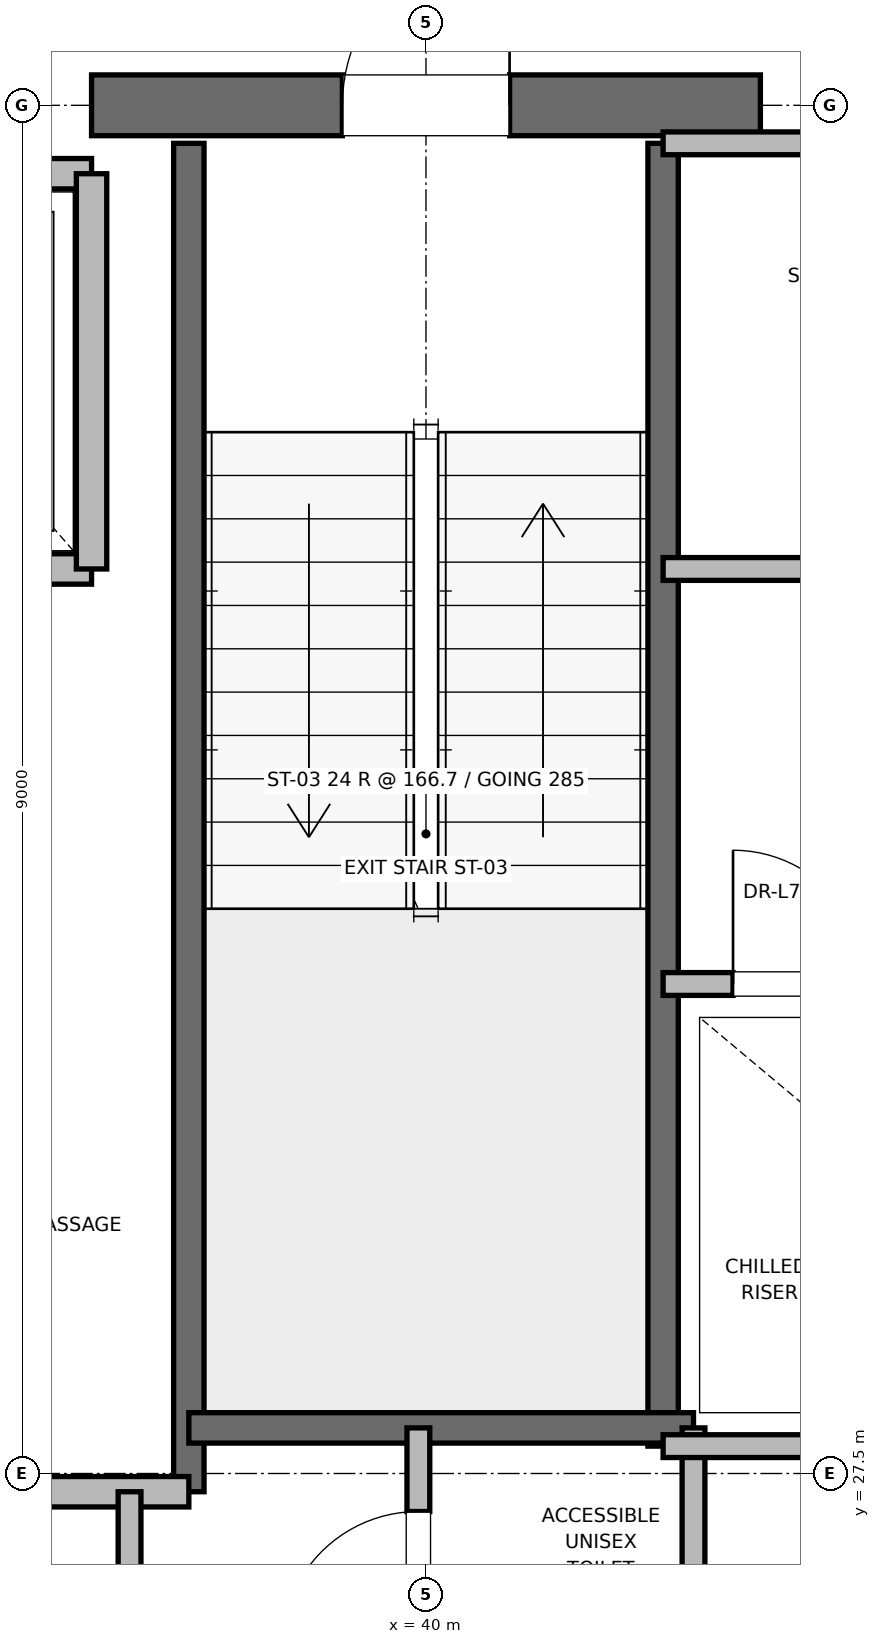
"""IFC4 building model, lengths in metres.
Left out: names, types, materials, properties, quantities, classifications, styles, units other than length and angle.
Written with IfcOpenShell. Run it as: python <this file> out.ifc"""

import sys

from ifc_helpers import new_model, si_unit, direction, frame, frame_2d, origin, place, context, subcontext, project, spatial, rectangle, extrude, element, fill, save


model = new_model("IFC4")
c1 = context("Model", 3, precision=1e-05, world=origin(), true_north=direction((0.0, 1.0)))
c2 = subcontext(c1, "Body", "Model", "MODEL_VIEW")
j1 = project(units=[si_unit("LENGTHUNIT", "METRE"), si_unit("PLANEANGLEUNIT", "RADIAN")], contexts=[c1])
p1 = place(None, origin())
s1 = spatial("IfcSite", under=j1, at=p1, CompositionType="ELEMENT")
p2 = place(p1, origin())
s2 = spatial("IfcBuilding", under=s1, at=p2, CompositionType="ELEMENT")
p3 = place(p2, frame((0.0, 0.0, 338.8)))
s3 = spatial("IfcBuildingStorey", under=s2, at=p3, CompositionType="ELEMENT", Elevation=338.8)
p4 = place(p3, frame((37.8, 36.5, 0.0), z_axis=(0.0, 0.0, 1.0), x_axis=(1.0, 0.0, 0.0)))
e1 = element("IfcWall", 1, at=p4, inside=s3, PredefinedType="SHEAR", context=c2, shape_type="SweptSolid", body=[
    extrude(rectangle(XDim=4.4, YDim=0.4, at=frame_2d((2.2, 0.0))), origin(), (0.0, 0.0, 1.0), 3.7),
])
p5 = place(p4, frame((1.65, 0.0, 0.0)))
e2 = element("IfcOpeningElement", 2, at=p5, cuts=e1, PredefinedType="OPENING", context=c2, shape_type="SweptSolid", body=[
    extrude(rectangle(XDim=1.1, YDim=2.15, at=frame_2d((0.55, 1.075))), frame((0.0, 0.2, 0.0), z_axis=(0.0, -1.0, 0.0), x_axis=(1.0, 0.0, 0.0)), (0.0, 0.0, 1.0), 0.4),
])
p6 = place(p3, frame((38.44, 27.38, 0.0), z_axis=(0.0, 0.0, 1.0), x_axis=(0.0, 1.0, 0.0)))
e3 = element("IfcWall", 3, at=p6, inside=s3, PredefinedType="SOLIDWALL", context=c2, shape_type="SweptSolid", body=[
    extrude(rectangle(XDim=8.87, YDim=0.2, at=frame_2d((4.435, 0.0))), origin(), (0.0, 0.0, 1.0), 3.7),
])
p7 = place(p3, frame((41.56, 27.68, 0.0), z_axis=(0.0, 0.0, 1.0), x_axis=(0.0, 1.0, 0.0)))
e4 = element("IfcWall", 4, at=p7, inside=s3, PredefinedType="SOLIDWALL", context=c2, shape_type="SweptSolid", body=[
    extrude(rectangle(XDim=8.57, YDim=0.2, at=frame_2d((4.285, 0.0))), origin(), (0.0, 0.0, 1.0), 3.7),
])
p8 = place(p3, frame((38.44, 27.8, 0.0), z_axis=(0.0, 0.0, 1.0), x_axis=(1.0, 0.0, 0.0)))
e5 = element("IfcWall", 5, at=p8, inside=s3, PredefinedType="SOLIDWALL", context=c2, shape_type="SweptSolid", body=[
    extrude(rectangle(XDim=3.32, YDim=0.2, at=frame_2d((1.66, 0.0))), origin(), (0.0, 0.0, 1.0), 3.7),
])
p9 = place(p3, frame((32.82, 27.38, 0.0), z_axis=(0.0, 0.0, 1.0), x_axis=(1.0, 0.0, 0.0)))
e6 = element("IfcWall", 6, at=p9, inside=s3, PredefinedType="PARTITIONING", context=c2, shape_type="SweptSolid", body=[
    extrude(rectangle(XDim=5.62, YDim=0.2, at=frame_2d((2.81, 0.0))), origin(), (0.0, 0.0, 1.0), 3.7),
])
p10 = place(p3, frame((35.5, 33.45, 0.0), z_axis=(0.0, 0.0, 1.0), x_axis=(1.0, 0.0, 0.0)))
e7 = element("IfcWall", 7, at=p10, inside=s3, PredefinedType="SOLIDWALL", context=c2, shape_type="SweptSolid", body=[
    extrude(rectangle(XDim=2.3, YDim=0.2, at=frame_2d((1.15, 0.0))), origin(), (0.0, 0.0, 1.0), 3.7),
])
p11 = place(p10, frame((0.6, 0.0, 0.0)))
e8 = element("IfcOpeningElement", 8, at=p11, cuts=e7, PredefinedType="OPENING", context=c2, shape_type="SweptSolid", body=[
    extrude(rectangle(XDim=1.1, YDim=2.2, at=frame_2d((0.55, 1.1))), frame((0.0, 0.1, 0.0), z_axis=(0.0, -1.0, 0.0), x_axis=(1.0, 0.0, 0.0)), (0.0, 0.0, 1.0), 0.2),
])
p12 = place(p3, frame((37.8, 36.05, 0.0), z_axis=(0.0, 0.0, 1.0), x_axis=(-1.0, 0.0, 0.0)))
e9 = element("IfcWall", 9, at=p12, inside=s3, PredefinedType="SOLIDWALL", context=c2, shape_type="SweptSolid", body=[
    extrude(rectangle(XDim=2.3, YDim=0.2, at=frame_2d((1.15, 0.0))), origin(), (0.0, 0.0, 1.0), 2.78),
])
p13 = place(p3, frame((37.8, 33.45, 0.0), z_axis=(0.0, 0.0, 1.0), x_axis=(0.0, 1.0, 0.0)))
e10 = element("IfcWall", 10, at=p13, inside=s3, PredefinedType="SOLIDWALL", context=c2, shape_type="SweptSolid", body=[
    extrude(rectangle(XDim=2.6, YDim=0.2, at=frame_2d((1.3, 0.0))), origin(), (0.0, 0.0, 1.0), 2.78),
])
p14 = place(p3, frame((41.76, 23.8, 0.0), z_axis=(0.0, 0.0, 1.0), x_axis=(0.0, 1.0, 0.0)))
e11 = element("IfcWall", 11, at=p14, inside=s3, PredefinedType="PARTITIONING", context=c2, shape_type="SweptSolid", body=[
    extrude(rectangle(XDim=4.0, YDim=0.15, at=frame_2d((2.0, 0.0))), origin(), (0.0, 0.0, 1.0), 2.85),
])
p15 = place(p3, frame((39.95, 25.8, 0.0), z_axis=(0.0, 0.0, 1.0), x_axis=(0.0, 1.0, 0.0)))
e12 = element("IfcWall", 12, at=p15, inside=s3, PredefinedType="PARTITIONING", context=c2, shape_type="SweptSolid", body=[
    extrude(rectangle(XDim=2.0, YDim=0.15, at=frame_2d((1.0, 0.0))), origin(), (0.0, 0.0, 1.0), 2.85),
])
p16 = place(p15, frame((0.55, 0.0, 0.0)))
e13 = element("IfcOpeningElement", 13, at=p16, cuts=e12, PredefinedType="OPENING", context=c2, shape_type="SweptSolid", body=[
    extrude(rectangle(XDim=0.9, YDim=2.1, at=frame_2d((0.45, 1.05))), frame((0.0, 0.075, 0.0), z_axis=(0.0, -1.0, 0.0), x_axis=(1.0, 0.0, 0.0)), (0.0, 0.0, 1.0), 0.15),
])
p17 = place(p3, frame((38.05, 23.06, 0.0), z_axis=(0.0, 0.0, 1.0), x_axis=(0.0, 1.0, 0.0)))
e14 = element("IfcWall", 14, at=p17, inside=s3, PredefinedType="PARTITIONING", context=c2, shape_type="SweptSolid", body=[
    extrude(rectangle(XDim=4.32, YDim=0.15, at=frame_2d((2.16, 0.0))), origin(), (0.0, 0.0, 1.0), 2.85),
])
p18 = place(p17, frame((1.66, 0.0, 0.0)))
e15 = element("IfcOpeningElement", 15, at=p18, cuts=e14, PredefinedType="OPENING", context=c2, shape_type="SweptSolid", body=[
    extrude(rectangle(XDim=1.0, YDim=2.15, at=frame_2d((0.5, 1.075))), frame((0.0, 0.075, 0.0), z_axis=(0.0, -1.0, 0.0), x_axis=(1.0, 0.0, 0.0)), (0.0, 0.0, 1.0), 0.15),
])
p19 = place(p3, frame((41.56, 27.68, 0.0), z_axis=(0.0, 0.0, 1.0), x_axis=(1.0, 0.0, 0.0)))
e16 = element("IfcWall", 16, at=p19, inside=s3, PredefinedType="PARTITIONING", context=c2, shape_type="SweptSolid", body=[
    extrude(rectangle(XDim=3.59, YDim=0.15, at=frame_2d((1.795, 0.0))), origin(), (0.0, 0.0, 1.0), 2.85),
])
p20 = place(p3, frame((41.56, 30.72, 0.0), z_axis=(0.0, 0.0, 1.0), x_axis=(1.0, 0.0, 0.0)))
e17 = element("IfcWall", 17, at=p20, inside=s3, PredefinedType="PARTITIONING", context=c2, shape_type="SweptSolid", body=[
    extrude(rectangle(XDim=1.8, YDim=0.15, at=frame_2d((0.9, 0.0))), origin(), (0.0, 0.0, 1.0), 2.85),
])
p21 = place(p20, frame((0.46, 0.0, 0.0)))
e18 = element("IfcOpeningElement", 18, at=p21, cuts=e17, PredefinedType="OPENING", context=c2, shape_type="SweptSolid", body=[
    extrude(rectangle(XDim=0.88, YDim=2.1, at=frame_2d((0.44, 1.05))), frame((0.0, 0.075, 0.0), z_axis=(0.0, -1.0, 0.0), x_axis=(1.0, 0.0, 0.0)), (0.0, 0.0, 1.0), 0.15),
])
p22 = place(p3, frame((41.56, 36.25, 0.0), z_axis=(0.0, 0.0, 1.0), x_axis=(1.0, 0.0, 0.0)))
e19 = element("IfcWall", 19, at=p22, inside=s3, PredefinedType="PARTITIONING", context=c2, shape_type="SweptSolid", body=[
    extrude(rectangle(XDim=2.94, YDim=0.15, at=frame_2d((1.47, 0.0))), origin(), (0.0, 0.0, 1.0), 2.78),
])
p23 = place(p3, frame((41.56, 33.45, 0.0), z_axis=(0.0, 0.0, 1.0), x_axis=(1.0, 0.0, 0.0)))
e20 = element("IfcWall", 20, at=p23, inside=s3, PredefinedType="PARTITIONING", context=c2, shape_type="SweptSolid", body=[
    extrude(rectangle(XDim=2.94, YDim=0.15, at=frame_2d((1.47, 0.0))), origin(), (0.0, 0.0, 1.0), 2.85),
])
p24 = place(p23, frame((1.03, 0.0, 0.0)))
e21 = element("IfcOpeningElement", 21, at=p24, cuts=e20, PredefinedType="OPENING", context=c2, shape_type="SweptSolid", body=[
    extrude(rectangle(XDim=0.88, YDim=2.1, at=frame_2d((0.44, 1.05))), frame((0.0, 0.075, 0.0), z_axis=(0.0, -1.0, 0.0), x_axis=(1.0, 0.0, 0.0)), (0.0, 0.0, 1.0), 0.15),
])
p25 = place(p5, origin())
e22 = element("IfcDoor", 22, at=p25, inside=s3, OperationType="SINGLE_SWING_RIGHT", PredefinedType="DOOR", context=c2, shape_type="SweptSolid", body=[
    extrude(rectangle(XDim=1.1, YDim=2.15, at=frame_2d((0.55, 1.075))), frame((0.0, 0.025, 0.0), z_axis=(0.0, -1.0, 0.0), x_axis=(1.0, 0.0, 0.0)), (0.0, 0.0, 1.0), 0.05),
])
fill(e2, e22)
p26 = place(p16, origin())
e23 = element("IfcDoor", 23, at=p26, inside=s3, OperationType="SINGLE_SWING_LEFT", PredefinedType="DOOR", context=c2, shape_type="SweptSolid", body=[
    extrude(rectangle(XDim=0.9, YDim=2.1, at=frame_2d((0.45, 1.05))), frame((0.0, 0.025, 0.0), z_axis=(0.0, -1.0, 0.0), x_axis=(1.0, 0.0, 0.0)), (0.0, 0.0, 1.0), 0.05),
])
fill(e13, e23)
p27 = place(p21, origin())
e24 = element("IfcDoor", 24, at=p27, inside=s3, OperationType="SINGLE_SWING_LEFT", PredefinedType="DOOR", context=c2, shape_type="SweptSolid", body=[
    extrude(rectangle(XDim=0.88, YDim=2.1, at=frame_2d((0.44, 1.05))), frame((0.0, 0.025, 0.0), z_axis=(0.0, -1.0, 0.0), x_axis=(1.0, 0.0, 0.0)), (0.0, 0.0, 1.0), 0.05),
])
fill(e18, e24)
save(model, sys.argv[1])
